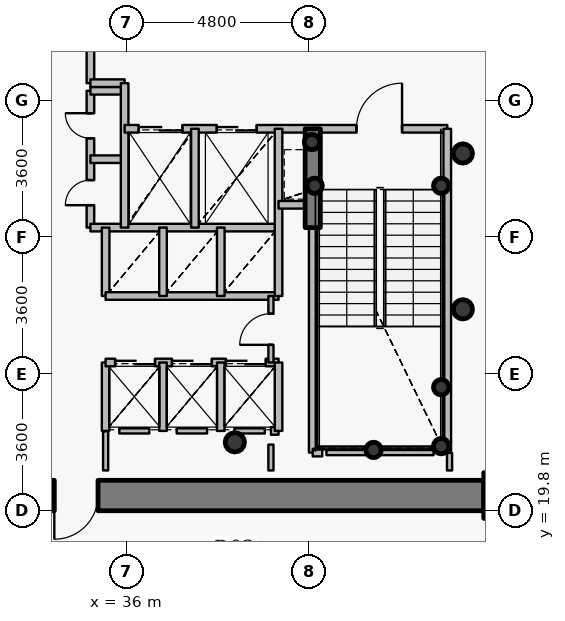
"""IFC4 building model, lengths in metres.
Left out: names, types, materials, properties, quantities, classifications, styles, units other than length and angle.
Written with IfcOpenShell. Run it as: python <this file> out.ifc"""

import sys

from ifc_helpers import new_model, si_unit, direction, frame, frame_2d, origin, origin_2d, place, context, subcontext, project, spatial, rectangle, hollow_circle, extrude, source, transform, mapped, element, fill, save


model = new_model("IFC4")
c1 = context("Model", 3, precision=1e-05, world=origin(), true_north=direction((0.0, 1.0)))
c2 = subcontext(c1, "Body", "Model", "MODEL_VIEW")
j1 = project(units=[si_unit("LENGTHUNIT", "METRE"), si_unit("PLANEANGLEUNIT", "RADIAN")], contexts=[c1])
p1 = place(None, origin())
s1 = spatial("IfcSite", under=j1, at=p1, CompositionType="ELEMENT")
p2 = place(p1, origin())
s2 = spatial("IfcBuilding", under=s1, at=p2, CompositionType="ELEMENT")
p3 = place(p2, frame((0.0, 0.0, 123.45)))
s3 = spatial("IfcBuildingStorey", under=s2, at=p3, CompositionType="ELEMENT", Elevation=123.45)
p4 = place(p3, frame((46.0, 20.2, 0.0), z_axis=(0.0, 0.0, 1.0), x_axis=(1.0, 0.0, 0.0)))
e1 = element("IfcColumn", 1, at=p4, inside=s3, PredefinedType="COLUMN", context=c2, shape_type="SweptSolid", body=[
    extrude(rectangle(XDim=1.2, YDim=1.2, at=origin_2d()), origin(), (0.0, 0.0, 1.0), 3.75),
])
p5 = place(p3, frame((38.85, 21.6, 0.0), z_axis=(0.0, 0.0, 1.0), x_axis=(1.0, 0.0, 0.0)))
e2 = element("IfcColumn", 2, at=p5, inside=s3, PredefinedType="COLUMN", context=c2, shape_type="SweptSolid", body=[
    extrude(hollow_circle(Radius=0.254, WallThickness=0.02, at=origin_2d()), origin(), (0.0, 0.0, 1.0), 3.75),
])
for number, where, z_axis, x_axis in (
    (3, (44.28, 21.5, 0.0), (0.0, 0.0, 1.0), (1.0, 0.0, 0.0)),
    (4, (44.28, 23.05, 0.0), (0.0, 0.0, 1.0), (1.0, 0.0, 0.0)),
    (5, (42.5, 21.4, 0.0), (0.0, 0.0, 1.0), (1.0, 0.0, 0.0)),
    (6, (40.95, 28.35, 0.0), (0.0, 0.0, 1.0), (1.0, 0.0, 0.0)),
    (7, (44.28, 28.35, 0.0), (0.0, 0.0, 1.0), (1.0, 0.0, 0.0)),
    (8, (40.88, 29.5, 0.0), (0.0, 0.0, 1.0), (1.0, 0.0, 0.0)),
):
    element("IfcColumn", number, at=place(p3, frame(where, z_axis=z_axis, x_axis=x_axis)), inside=s3, PredefinedType="COLUMN", context=c2, shape_type="SweptSolid", body=[
        extrude(hollow_circle(Radius=0.203, WallThickness=0.016, at=origin_2d()), origin(), (0.0, 0.0, 1.0), 3.75),
    ])
p6 = place(p3, frame((45.4, 20.2, 0.0), z_axis=(0.0, 0.0, 1.0), x_axis=(-1.0, 0.0, 0.0)))
e9 = element("IfcWall", 9, at=p6, inside=s3, PredefinedType="SHEAR", context=c2, shape_type="SweptSolid", body=[
    extrude(rectangle(XDim=18.8, YDim=0.8, at=frame_2d((9.4, 0.0))), origin(), (0.0, 0.0, 1.0), 2.95),
])
p7 = place(p6, frame((10.15, 0.0, 0.0)))
e10 = element("IfcOpeningElement", 10, at=p7, cuts=e9, PredefinedType="OPENING", context=c2, shape_type="SweptSolid", body=[
    extrude(rectangle(XDim=1.15, YDim=2.15, at=origin_2d()), frame((0.575, 0.41, 1.075), z_axis=(0.0, -1.0, 0.0), x_axis=(1.0, 0.0, 0.0)), (0.0, 0.0, 1.0), 0.82),
])
p8 = place(p3, frame((40.9, 27.25, 0.0), z_axis=(0.0, 0.0, 1.0), x_axis=(0.0, 1.0, 0.0)))
e11 = element("IfcWall", 11, at=p8, inside=s3, PredefinedType="SHEAR", context=c2, shape_type="SweptSolid", body=[
    extrude(rectangle(XDim=2.6, YDim=0.4, at=frame_2d((1.3, 0.0))), origin(), (0.0, 0.0, 1.0), 3.1),
])
for number, where, z_axis, x_axis in (
    (12, (44.85, 25.1, 0.0), (0.0, 0.0, 1.0), (1.0, 0.0, 0.0)),
    (13, (44.85, 29.2, 0.0), (0.0, 0.0, 1.0), (1.0, 0.0, 0.0)),
):
    element("IfcColumn", number, at=place(p3, frame(where, z_axis=z_axis, x_axis=x_axis)), inside=s3, PredefinedType="COLUMN", context=c2, shape_type="SweptSolid", body=[
        extrude(hollow_circle(Radius=0.254, WallThickness=0.02, at=origin_2d()), origin(), (0.0, 0.0, 1.0), 3.75),
    ])
p9 = place(p3, frame((35.05, 27.25, 0.0), z_axis=(0.0, 0.0, 1.0), x_axis=(0.0, 1.0, 0.0)))
e14 = element("IfcWall", 14, at=p9, inside=s3, PredefinedType="PARTITIONING", context=c2, shape_type="SweptSolid", body=[
    extrude(rectangle(XDim=3.6, YDim=0.2, at=frame_2d((1.8, 0.0))), origin(), (0.0, 0.0, 1.0), 3.5),
])
p10 = place(p9, frame((0.59, 0.0, 0.0)))
e15 = element("IfcOpeningElement", 15, at=p10, cuts=e14, PredefinedType="OPENING", context=c2, shape_type="SweptSolid", body=[
    extrude(rectangle(XDim=0.66, YDim=2.05, at=origin_2d()), frame((0.33, 0.11, 1.025), z_axis=(0.0, -1.0, 0.0), x_axis=(1.0, 0.0, 0.0)), (0.0, 0.0, 1.0), 0.22),
])
p11 = place(p9, frame((2.35, 0.0, 0.0)))
e16 = element("IfcOpeningElement", 16, at=p11, cuts=e14, PredefinedType="OPENING", context=c2, shape_type="SweptSolid", body=[
    extrude(rectangle(XDim=0.66, YDim=2.05, at=origin_2d()), frame((0.33, 0.11, 1.025), z_axis=(0.0, -1.0, 0.0), x_axis=(1.0, 0.0, 0.0)), (0.0, 0.0, 1.0), 0.22),
])
p12 = place(p3, frame((35.05, 27.25, 0.0), z_axis=(0.0, 0.0, 1.0), x_axis=(1.0, 0.0, 0.0)))
e17 = element("IfcWall", 17, at=p12, inside=s3, PredefinedType="PARTITIONING", context=c2, shape_type="SweptSolid", body=[
    extrude(rectangle(XDim=4.95, YDim=0.2, at=frame_2d((2.475, 0.0))), origin(), (0.0, 0.0, 1.0), 3.085),
])
for number, where, z_axis, x_axis in (
    (18, (35.05, 29.05, 0.0), (0.0, 0.0, 1.0), (1.0, 0.0, 0.0)),
    (19, (35.05, 30.85, 0.0), (0.0, 0.0, 1.0), (1.0, 0.0, 0.0)),
):
    element("IfcWall", number, at=place(p3, frame(where, z_axis=z_axis, x_axis=x_axis)), inside=s3, PredefinedType="PARTITIONING", context=c2, shape_type="SweptSolid", body=[
        extrude(rectangle(XDim=0.9, YDim=0.2, at=frame_2d((0.45, 0.0))), origin(), (0.0, 0.0, 1.0), 3.5),
    ])
p13 = place(p3, frame((35.05, 31.05, 0.0), z_axis=(0.0, 0.0, 1.0), x_axis=(0.0, 1.0, 0.0)))
e20 = element("IfcWall", 20, at=p13, inside=s3, PredefinedType="PARTITIONING", context=c2, shape_type="SweptSolid", body=[
    extrude(rectangle(XDim=2.35, YDim=0.2, at=frame_2d((1.175, 0.0))), origin(), (0.0, 0.0, 1.0), 3.085),
])
p14 = place(p3, frame((35.05, 31.05, 0.0), z_axis=(0.0, 0.0, 1.0), x_axis=(1.0, 0.0, 0.0)))
e21 = element("IfcWall", 21, at=p14, inside=s3, PredefinedType="PARTITIONING", context=c2, shape_type="SweptSolid", body=[
    extrude(rectangle(XDim=0.9, YDim=0.2, at=frame_2d((0.45, 0.0))), origin(), (0.0, 0.0, 1.0), 3.5),
])
p15 = place(p3, frame((35.45, 21.9, 0.0), z_axis=(0.0, 0.0, 1.0), x_axis=(0.0, 1.0, 0.0)))
e22 = element("IfcWall", 22, at=p15, inside=s3, PredefinedType="PARTITIONING", context=c2, shape_type="SweptSolid", body=[
    extrude(rectangle(XDim=1.8, YDim=0.2, at=frame_2d((0.9, 0.0))), origin(), (0.0, 0.0, 1.0), 3.5),
])
p16 = place(p3, frame((35.45, 23.7, 0.0), z_axis=(0.0, 0.0, 1.0), x_axis=(1.0, 0.0, 0.0)))
e23 = element("IfcWall", 23, at=p16, inside=s3, PredefinedType="PARTITIONING", context=c2, shape_type="SweptSolid", body=[
    extrude(rectangle(XDim=4.55, YDim=0.2, at=frame_2d((2.275, 0.0))), origin(), (0.0, 0.0, 1.0), 3.085),
])
p17 = place(p16, frame((0.25, 0.0, 0.0)))
e24 = element("IfcOpeningElement", 24, at=p17, cuts=e23, PredefinedType="OPENING", context=c2, shape_type="SweptSolid", body=[
    extrude(rectangle(XDim=1.05, YDim=2.15, at=origin_2d()), frame((0.525, 0.11, 1.075), z_axis=(0.0, -1.0, 0.0), x_axis=(1.0, 0.0, 0.0)), (0.0, 0.0, 1.0), 0.22),
])
p18 = place(p16, frame((1.745, 0.0, 0.0)))
e25 = element("IfcOpeningElement", 25, at=p18, cuts=e23, PredefinedType="OPENING", context=c2, shape_type="SweptSolid", body=[
    extrude(rectangle(XDim=1.05, YDim=2.15, at=origin_2d()), frame((0.525, 0.11, 1.075), z_axis=(0.0, -1.0, 0.0), x_axis=(1.0, 0.0, 0.0)), (0.0, 0.0, 1.0), 0.22),
])
p19 = place(p16, frame((3.165, 0.0, 0.0)))
e26 = element("IfcOpeningElement", 26, at=p19, cuts=e23, PredefinedType="OPENING", context=c2, shape_type="SweptSolid", body=[
    extrude(rectangle(XDim=1.05, YDim=2.15, at=origin_2d()), frame((0.525, 0.11, 1.075), z_axis=(0.0, -1.0, 0.0), x_axis=(1.0, 0.0, 0.0)), (0.0, 0.0, 1.0), 0.22),
])
p20 = place(p3, frame((35.45, 25.45, 0.0), z_axis=(0.0, 0.0, 1.0), x_axis=(0.0, 1.0, 0.0)))
e27 = element("IfcWall", 27, at=p20, inside=s3, PredefinedType="PARTITIONING", context=c2, shape_type="SweptSolid", body=[
    extrude(rectangle(XDim=1.8, YDim=0.2, at=frame_2d((0.9, 0.0))), origin(), (0.0, 0.0, 1.0), 3.5),
])
p21 = place(p3, frame((35.45, 25.45, 0.0), z_axis=(0.0, 0.0, 1.0), x_axis=(1.0, 0.0, 0.0)))
e28 = element("IfcWall", 28, at=p21, inside=s3, PredefinedType="PARTITIONING", context=c2, shape_type="SweptSolid", body=[
    extrude(rectangle(XDim=4.55, YDim=0.2, at=frame_2d((2.275, 0.0))), origin(), (0.0, 0.0, 1.0), 3.085),
])
p22 = place(p3, frame((35.95, 27.25, 0.0), z_axis=(0.0, 0.0, 1.0), x_axis=(0.0, 1.0, 0.0)))
e29 = element("IfcWall", 29, at=p22, inside=s3, PredefinedType="PARTITIONING", context=c2, shape_type="SweptSolid", body=[
    extrude(rectangle(XDim=3.8, YDim=0.2, at=frame_2d((1.9, 0.0))), origin(), (0.0, 0.0, 1.0), 3.5),
])
p23 = place(p3, frame((35.95, 29.85, 0.0), z_axis=(0.0, 0.0, 1.0), x_axis=(1.0, 0.0, 0.0)))
e30 = element("IfcWall", 30, at=p23, inside=s3, PredefinedType="PARTITIONING", context=c2, shape_type="SweptSolid", body=[
    extrude(rectangle(XDim=8.49, YDim=0.2, at=frame_2d((4.245, 0.0))), origin(), (0.0, 0.0, 1.0), 3.085),
])
p24 = place(p23, frame((6.1, 0.0, 0.0)))
e31 = element("IfcOpeningElement", 31, at=p24, cuts=e30, PredefinedType="OPENING", context=c2, shape_type="SweptSolid", body=[
    extrude(rectangle(XDim=1.2, YDim=2.15, at=origin_2d()), frame((0.6, 0.11, 1.075), z_axis=(0.0, -1.0, 0.0), x_axis=(1.0, 0.0, 0.0)), (0.0, 0.0, 1.0), 0.22),
])
p25 = place(p23, frame((0.37, 0.0, 0.0)))
e32 = element("IfcOpeningElement", 32, at=p25, cuts=e30, PredefinedType="OPENING", context=c2, shape_type="SweptSolid", body=[
    extrude(rectangle(XDim=1.15, YDim=2.15, at=origin_2d()), frame((0.575, 0.11, 1.075), z_axis=(0.0, -1.0, 0.0), x_axis=(1.0, 0.0, 0.0)), (0.0, 0.0, 1.0), 0.22),
])
p26 = place(p23, frame((2.425, 0.0, 0.0)))
e33 = element("IfcOpeningElement", 33, at=p26, cuts=e30, PredefinedType="OPENING", context=c2, shape_type="SweptSolid", body=[
    extrude(rectangle(XDim=1.05, YDim=2.15, at=origin_2d()), frame((0.525, 0.11, 1.075), z_axis=(0.0, -1.0, 0.0), x_axis=(1.0, 0.0, 0.0)), (0.0, 0.0, 1.0), 0.22),
])
for number, where, z_axis, x_axis in (
    (34, (36.96, 21.9, 0.0), (0.0, 0.0, 1.0), (0.0, 1.0, 0.0)),
    (35, (36.96, 25.45, 0.0), (0.0, 0.0, 1.0), (0.0, 1.0, 0.0)),
):
    element("IfcWall", number, at=place(p3, frame(where, z_axis=z_axis, x_axis=x_axis)), inside=s3, PredefinedType="PARTITIONING", context=c2, shape_type="SweptSolid", body=[
        extrude(rectangle(XDim=1.8, YDim=0.2, at=frame_2d((0.9, 0.0))), origin(), (0.0, 0.0, 1.0), 3.5),
    ])
p27 = place(p3, frame((37.8, 27.25, 0.0), z_axis=(0.0, 0.0, 1.0), x_axis=(0.0, 1.0, 0.0)))
e36 = element("IfcWall", 36, at=p27, inside=s3, PredefinedType="PARTITIONING", context=c2, shape_type="SweptSolid", body=[
    extrude(rectangle(XDim=2.6, YDim=0.2, at=frame_2d((1.3, 0.0))), origin(), (0.0, 0.0, 1.0), 3.5),
])
for number, where, z_axis, x_axis in (
    (37, (38.48, 21.9, 0.0), (0.0, 0.0, 1.0), (0.0, 1.0, 0.0)),
    (38, (38.48, 25.45, 0.0), (0.0, 0.0, 1.0), (0.0, 1.0, 0.0)),
):
    element("IfcWall", number, at=place(p3, frame(where, z_axis=z_axis, x_axis=x_axis)), inside=s3, PredefinedType="PARTITIONING", context=c2, shape_type="SweptSolid", body=[
        extrude(rectangle(XDim=1.8, YDim=0.2, at=frame_2d((0.9, 0.0))), origin(), (0.0, 0.0, 1.0), 3.5),
    ])
p28 = place(p3, frame((39.8, 21.9, 0.0), z_axis=(0.0, 0.0, 1.0), x_axis=(1.0, 0.0, 0.0)))
e39 = element("IfcWall", 39, at=p28, inside=s3, PredefinedType="PARTITIONING", context=c2, shape_type="SweptSolid", body=[
    extrude(rectangle(XDim=0.2, YDim=0.2, at=frame_2d((0.1, 0.0))), origin(), (0.0, 0.0, 1.0), 3.5),
])
p29 = place(p3, frame((39.8, 23.7, 0.0), z_axis=(0.0, 0.0, 1.0), x_axis=(0.0, 1.0, 0.0)))
e40 = element("IfcWall", 40, at=p29, inside=s3, PredefinedType="PARTITIONING", context=c2, shape_type="SweptSolid", body=[
    extrude(rectangle(XDim=1.75, YDim=0.135, at=frame_2d((0.875, 0.0))), origin(), (0.0, 0.0, 1.0), 3.5),
])
p30 = place(p29, frame((0.465, 0.0, 0.0)))
e41 = element("IfcOpeningElement", 41, at=p30, cuts=e40, PredefinedType="OPENING", context=c2, shape_type="SweptSolid", body=[
    extrude(rectangle(XDim=0.82, YDim=2.1, at=origin_2d()), frame((0.41, 0.078, 1.05), z_axis=(0.0, -1.0, 0.0), x_axis=(1.0, 0.0, 0.0)), (0.0, 0.0, 1.0), 0.155),
])
p31 = place(p3, frame((40.0, 21.9, 0.0), z_axis=(0.0, 0.0, 1.0), x_axis=(0.0, 1.0, 0.0)))
e42 = element("IfcWall", 42, at=p31, inside=s3, PredefinedType="PARTITIONING", context=c2, shape_type="SweptSolid", body=[
    extrude(rectangle(XDim=1.8, YDim=0.2, at=frame_2d((0.9, 0.0))), origin(), (0.0, 0.0, 1.0), 3.5),
])
p32 = place(p3, frame((40.0, 25.45, 0.0), z_axis=(0.0, 0.0, 1.0), x_axis=(0.0, 1.0, 0.0)))
e43 = element("IfcWall", 43, at=p32, inside=s3, PredefinedType="PARTITIONING", context=c2, shape_type="SweptSolid", body=[
    extrude(rectangle(XDim=4.4, YDim=0.2, at=frame_2d((2.2, 0.0))), origin(), (0.0, 0.0, 1.0), 3.5),
])
p33 = place(p3, frame((40.0, 27.85, 0.0), z_axis=(0.0, 0.0, 1.0), x_axis=(1.0, 0.0, 0.0)))
e44 = element("IfcWall", 44, at=p33, inside=s3, PredefinedType="PARTITIONING", context=c2, shape_type="SweptSolid", body=[
    extrude(rectangle(XDim=0.9, YDim=0.2, at=frame_2d((0.45, 0.0))), origin(), (0.0, 0.0, 1.0), 3.5),
])
p34 = place(p3, frame((40.9, 21.33, 0.0), z_axis=(0.0, 0.0, 1.0), x_axis=(0.0, 1.0, 0.0)))
e45 = element("IfcWall", 45, at=p34, inside=s3, PredefinedType="PARTITIONING", context=c2, shape_type="SweptSolid", body=[
    extrude(rectangle(XDim=5.91, YDim=0.2, at=frame_2d((2.955, 0.0))), origin(), (0.0, 0.0, 1.0), 3.035),
])
p35 = place(p3, frame((40.9, 21.33, 0.0), z_axis=(0.0, 0.0, 1.0), x_axis=(1.0, 0.0, 0.0)))
e46 = element("IfcWall", 46, at=p35, inside=s3, PredefinedType="PARTITIONING", context=c2, shape_type="SweptSolid", body=[
    extrude(rectangle(XDim=0.25, YDim=0.2, at=frame_2d((0.125, 0.0))), origin(), (0.0, 0.0, 1.0), 3.035),
])
p36 = place(p3, frame((44.44, 21.33, 0.0), z_axis=(0.0, 0.0, 1.0), x_axis=(0.0, 1.0, 0.0)))
e47 = element("IfcWall", 47, at=p36, inside=s3, PredefinedType="PARTITIONING", context=c2, shape_type="SweptSolid", body=[
    extrude(rectangle(XDim=8.52, YDim=0.2, at=frame_2d((4.26, 0.0))), origin(), (0.0, 0.0, 1.0), 3.5),
])
p37 = place(p3, frame((44.08, 21.33, 0.0), z_axis=(0.0, 0.0, 1.0), x_axis=(-1.0, 0.0, 0.0)))
e48 = element("IfcWall", 48, at=p37, inside=s3, PredefinedType="PARTITIONING", context=c2, shape_type="SweptSolid", body=[
    extrude(rectangle(XDim=2.82, YDim=0.135, at=frame_2d((1.41, 0.0))), origin(), (0.0, 0.0, 1.0), 3.035),
])
p38 = place(p3, frame((36.6, 21.9, 0.0), z_axis=(0.0, 0.0, 1.0), x_axis=(-1.0, 0.0, 0.0)))
e49 = element("IfcWall", 49, at=p38, inside=s3, PredefinedType="PARTITIONING", context=c2, shape_type="SweptSolid", body=[
    extrude(rectangle(XDim=0.79, YDim=0.135, at=frame_2d((0.395, 0.0))), origin(), (0.0, 0.0, 1.0), 3.5),
])
p39 = place(p3, frame((38.12, 21.9, 0.0), z_axis=(0.0, 0.0, 1.0), x_axis=(-1.0, 0.0, 0.0)))
e50 = element("IfcWall", 50, at=p39, inside=s3, PredefinedType="PARTITIONING", context=c2, shape_type="SweptSolid", body=[
    extrude(rectangle(XDim=0.8, YDim=0.135, at=frame_2d((0.4, 0.0))), origin(), (0.0, 0.0, 1.0), 3.5),
])
p40 = place(p3, frame((39.64, 21.9, 0.0), z_axis=(0.0, 0.0, 1.0), x_axis=(-1.0, 0.0, 0.0)))
e51 = element("IfcWall", 51, at=p40, inside=s3, PredefinedType="PARTITIONING", context=c2, shape_type="SweptSolid", body=[
    extrude(rectangle(XDim=0.8, YDim=0.135, at=frame_2d((0.4, 0.0))), origin(), (0.0, 0.0, 1.0), 3.085),
])
p41 = place(p3, frame((39.8, 20.86, 0.0), z_axis=(0.0, 0.0, 1.0), x_axis=(0.0, 1.0, 0.0)))
e52 = element("IfcWall", 52, at=p41, inside=s3, PredefinedType="PARTITIONING", context=c2, shape_type="SweptSolid", body=[
    extrude(rectangle(XDim=0.68, YDim=0.135, at=frame_2d((0.34, 0.0))), origin(), (0.0, 0.0, 1.0), 3.035),
])
p42 = place(p3, frame((44.5, 20.86, 0.0), z_axis=(0.0, 0.0, 1.0), x_axis=(0.0, 1.0, 0.0)))
e53 = element("IfcWall", 53, at=p42, inside=s3, PredefinedType="PARTITIONING", context=c2, shape_type="SweptSolid", body=[
    extrude(rectangle(XDim=0.46, YDim=0.135, at=frame_2d((0.23, 0.0))), origin(), (0.0, 0.0, 1.0), 3.5),
])
p43 = place(p3, frame((35.45, 21.89, 0.0), z_axis=(0.0, 0.0, 1.0), x_axis=(0.0, -1.0, 0.0)))
e54 = element("IfcWall", 54, at=p43, inside=s3, PredefinedType="PARTITIONING", context=c2, shape_type="SweptSolid", body=[
    extrude(rectangle(XDim=1.03, YDim=0.135, at=frame_2d((0.515, 0.0))), origin(), (0.0, 0.0, 1.0), 3.085),
])
p44 = place(p3, frame((45.41, 19.8, 0.0), z_axis=(0.0, 0.0, 1.0), x_axis=(1.0, 0.0, 0.0)))
e55 = element("IfcWall", 55, at=p44, inside=s3, PredefinedType="PARTITIONING", context=c2, shape_type="SweptSolid", body=[
    extrude(rectangle(XDim=0.99, YDim=0.135, at=frame_2d((0.495, 0.0))), origin(), (0.0, 0.0, 1.0), 2.935),
])
m1 = source(origin(), c2, "Body", "SweptSolid", [
    extrude(rectangle(XDim=1.15, YDim=2.15, at=origin_2d()), frame((0.575, 0.025, 1.075), z_axis=(0.0, -1.0, 0.0), x_axis=(1.0, 0.0, 0.0)), (0.0, 0.0, 1.0), 0.05),
])
p45 = place(p7, origin())
e56 = element("IfcDoor", 56, at=p45, inside=s3, OperationType="SINGLE_SWING_RIGHT", PredefinedType="DOOR", context=c2, shape_type="MappedRepresentation", body=[
    mapped(m1, transform((0.0, 0.0, 0.0), x_axis=(1.0, 0.0, 0.0), y_axis=(0.0, 1.0, 0.0), z_axis=(0.0, 0.0, 1.0), scale=1.0)),
])
fill(e10, e56)
m2 = source(origin(), c2, "Body", "SweptSolid", [
    extrude(rectangle(XDim=1.2, YDim=2.15, at=origin_2d()), frame((0.6, 0.025, 1.075), z_axis=(0.0, -1.0, 0.0), x_axis=(1.0, 0.0, 0.0)), (0.0, 0.0, 1.0), 0.05),
])
p46 = place(p24, origin())
e57 = element("IfcDoor", 57, at=p46, inside=s3, OperationType="SINGLE_SWING_RIGHT", PredefinedType="DOOR", context=c2, shape_type="MappedRepresentation", body=[
    mapped(m2, transform((0.0, 0.0, 0.0), x_axis=(1.0, 0.0, 0.0), y_axis=(0.0, 1.0, 0.0), z_axis=(0.0, 0.0, 1.0), scale=1.0)),
])
fill(e31, e57)
m3 = source(origin(), c2, "Body", "SweptSolid", [
    extrude(rectangle(XDim=1.15, YDim=2.15, at=origin_2d()), frame((0.575, 0.025, 1.075), z_axis=(0.0, -1.0, 0.0), x_axis=(1.0, 0.0, 0.0)), (0.0, 0.0, 1.0), 0.05),
])
p47 = place(p25, origin())
e58 = element("IfcDoor", 58, at=p47, inside=s3, OperationType="DOUBLE_DOOR_SLIDING", PredefinedType="USERDEFINED", context=c2, shape_type="MappedRepresentation", body=[
    mapped(m3, transform((0.0, 0.0, 0.0), x_axis=(1.0, 0.0, 0.0), y_axis=(0.0, 1.0, 0.0), z_axis=(0.0, 0.0, 1.0), scale=1.0)),
])
fill(e32, e58)
m4 = source(origin(), c2, "Body", "SweptSolid", [
    extrude(rectangle(XDim=1.05, YDim=2.15, at=origin_2d()), frame((0.525, 0.025, 1.075), z_axis=(0.0, -1.0, 0.0), x_axis=(1.0, 0.0, 0.0)), (0.0, 0.0, 1.0), 0.05),
])
p48 = place(p26, origin())
e59 = element("IfcDoor", 59, at=p48, inside=s3, OperationType="DOUBLE_DOOR_SLIDING", PredefinedType="USERDEFINED", context=c2, shape_type="MappedRepresentation", body=[
    mapped(m4, transform((0.0, 0.0, 0.0), x_axis=(1.0, 0.0, 0.0), y_axis=(0.0, 1.0, 0.0), z_axis=(0.0, 0.0, 1.0), scale=1.0)),
])
fill(e33, e59)
p49 = place(p17, origin())
e60 = element("IfcDoor", 60, at=p49, inside=s3, OperationType="DOUBLE_DOOR_SLIDING", PredefinedType="USERDEFINED", context=c2, shape_type="MappedRepresentation", body=[
    mapped(m4, transform((0.0, 0.0, 0.0), x_axis=(1.0, 0.0, 0.0), y_axis=(0.0, 1.0, 0.0), z_axis=(0.0, 0.0, 1.0), scale=1.0)),
])
fill(e24, e60)
p50 = place(p18, origin())
e61 = element("IfcDoor", 61, at=p50, inside=s3, OperationType="DOUBLE_DOOR_SLIDING", PredefinedType="USERDEFINED", context=c2, shape_type="MappedRepresentation", body=[
    mapped(m4, transform((0.0, 0.0, 0.0), x_axis=(1.0, 0.0, 0.0), y_axis=(0.0, 1.0, 0.0), z_axis=(0.0, 0.0, 1.0), scale=1.0)),
])
fill(e25, e61)
p51 = place(p19, origin())
e62 = element("IfcDoor", 62, at=p51, inside=s3, OperationType="DOUBLE_DOOR_SLIDING", PredefinedType="USERDEFINED", context=c2, shape_type="MappedRepresentation", body=[
    mapped(m4, transform((0.0, 0.0, 0.0), x_axis=(1.0, 0.0, 0.0), y_axis=(0.0, 1.0, 0.0), z_axis=(0.0, 0.0, 1.0), scale=1.0)),
])
fill(e26, e62)
m5 = source(origin(), c2, "Body", "SweptSolid", [
    extrude(rectangle(XDim=0.66, YDim=2.05, at=origin_2d()), frame((0.33, 0.025, 1.025), z_axis=(0.0, -1.0, 0.0), x_axis=(1.0, 0.0, 0.0)), (0.0, 0.0, 1.0), 0.05),
])
p52 = place(p10, origin())
e63 = element("IfcDoor", 63, at=p52, inside=s3, OperationType="SINGLE_SWING_LEFT", PredefinedType="USERDEFINED", context=c2, shape_type="MappedRepresentation", body=[
    mapped(m5, transform((0.0, 0.0, 0.0), x_axis=(1.0, 0.0, 0.0), y_axis=(0.0, 1.0, 0.0), z_axis=(0.0, 0.0, 1.0), scale=1.0)),
])
fill(e15, e63)
p53 = place(p11, origin())
e64 = element("IfcDoor", 64, at=p53, inside=s3, OperationType="SINGLE_SWING_RIGHT", PredefinedType="USERDEFINED", context=c2, shape_type="MappedRepresentation", body=[
    mapped(m5, transform((0.0, 0.0, 0.0), x_axis=(1.0, 0.0, 0.0), y_axis=(0.0, 1.0, 0.0), z_axis=(0.0, 0.0, 1.0), scale=1.0)),
])
fill(e16, e64)
m6 = source(origin(), c2, "Body", "SweptSolid", [
    extrude(rectangle(XDim=0.82, YDim=2.1, at=origin_2d()), frame((0.41, 0.025, 1.05), z_axis=(0.0, -1.0, 0.0), x_axis=(1.0, 0.0, 0.0)), (0.0, 0.0, 1.0), 0.05),
])
p54 = place(p30, origin())
e65 = element("IfcDoor", 65, at=p54, inside=s3, OperationType="SINGLE_SWING_LEFT", PredefinedType="DOOR", context=c2, shape_type="MappedRepresentation", body=[
    mapped(m6, transform((0.0, 0.0, 0.0), x_axis=(1.0, 0.0, 0.0), y_axis=(0.0, 1.0, 0.0), z_axis=(0.0, 0.0, 1.0), scale=1.0)),
])
fill(e41, e65)
save(model, sys.argv[1])
